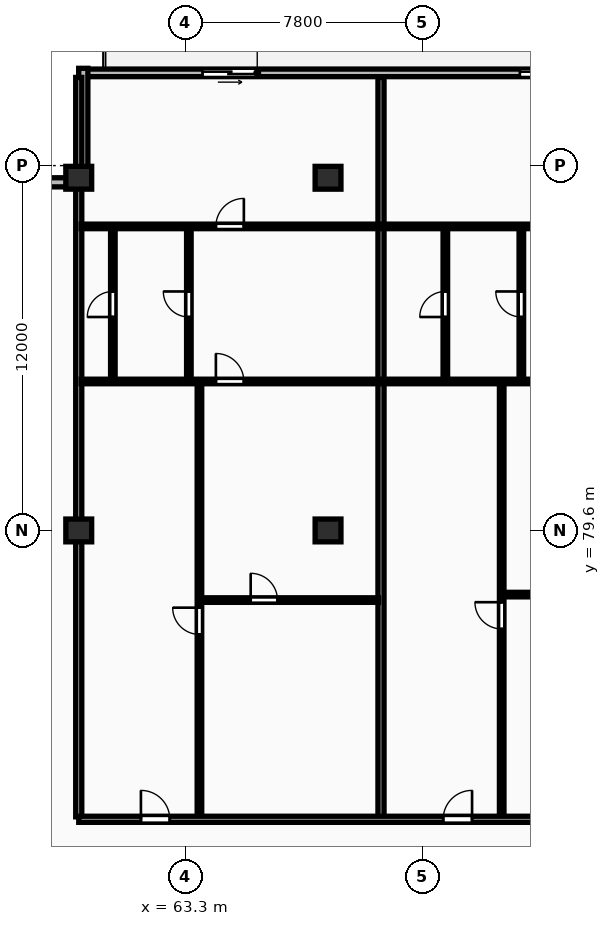
"""IFC4 building model, lengths in metres.
Left out: names, types, materials, properties, quantities, classifications, styles, units other than length and angle.
Written with IfcOpenShell. Run it as: python <this file> out.ifc"""

import sys

from ifc_helpers import new_model, si_unit, direction, frame, frame_2d, origin, origin_2d, place, context, subcontext, project, spatial, rectangle, extrude, element, fill, save


model = new_model("IFC4")
c1 = context("Model", 3, precision=1e-05, world=origin(), true_north=direction((0.0, 1.0)))
c2 = subcontext(c1, "Body", "Model", "MODEL_VIEW")
j1 = project(units=[si_unit("LENGTHUNIT", "METRE"), si_unit("PLANEANGLEUNIT", "RADIAN")], contexts=[c1])
p1 = place(None, origin())
s1 = spatial("IfcSite", under=j1, at=p1, CompositionType="ELEMENT")
p2 = place(p1, origin())
s2 = spatial("IfcBuilding", under=s1, at=p2, CompositionType="ELEMENT")
p3 = place(p2, frame((0.0, 0.0, 204.35)))
s3 = spatial("IfcBuildingStorey", under=s2, at=p3, CompositionType="ELEMENT", Elevation=204.35)
for number, where, z_axis, x_axis in (
    (1, (59.8, 79.6, 0.0), (0.0, 0.0, 1.0), (1.0, 0.0, 0.0)),
    (2, (59.8, 91.2, 0.0), (0.0, 0.0, 1.0), (1.0, 0.0, 0.0)),
    (3, (68.0, 79.6, 0.0), (0.0, 0.0, 1.0), (1.0, 0.0, 0.0)),
    (4, (68.0, 91.2, 0.0), (0.0, 0.0, 1.0), (1.0, 0.0, 0.0)),
):
    element("IfcColumn", number, at=place(p3, frame(where, z_axis=z_axis, x_axis=x_axis)), inside=s3, PredefinedType="COLUMN", context=c2, shape_type="SweptSolid", body=[
        extrude(rectangle(XDim=0.85, YDim=0.75, at=origin_2d()), origin(), (0.0, 0.0, 1.0), 3.25),
    ])
p4 = place(p3, frame((128.4, 94.65, 0.0), z_axis=(0.0, 0.0, 1.0), x_axis=(-1.0, 0.0, 0.0)))
e5 = element("IfcWall", 5, at=p4, inside=s3, PredefinedType="STANDARD", context=c2, shape_type="SweptSolid", body=[
    extrude(rectangle(XDim=68.6, YDim=0.25, at=frame_2d((34.3, 0.0))), origin(), (0.0, 0.0, 1.0), 2.98),
])
p5 = place(p4, frame((62.729, 0.0, 0.0)))
e6 = element("IfcOpeningElement", 6, at=p5, cuts=e5, PredefinedType="OPENING", context=c2, shape_type="SweptSolid", body=[
    extrude(rectangle(XDim=1.8, YDim=2.2, at=frame_2d((0.9, 1.1))), frame((0.0, 0.135, 0.0), z_axis=(0.0, -1.0, 0.0), x_axis=(1.0, 0.0, 0.0)), (0.0, 0.0, 1.0), 0.27),
])
p6 = place(p4, frame((52.29, 0.0, 0.0)))
e7 = element("IfcOpeningElement", 7, at=p6, cuts=e5, PredefinedType="OPENING", context=c2, shape_type="SweptSolid", body=[
    extrude(rectangle(XDim=1.8, YDim=2.2, at=frame_2d((0.9, 1.1))), frame((0.0, 0.135, 0.0), z_axis=(0.0, -1.0, 0.0), x_axis=(1.0, 0.0, 0.0)), (0.0, 0.0, 1.0), 0.27),
])
p7 = place(p4, frame((41.851, 0.0, 0.0)))
e8 = element("IfcOpeningElement", 8, at=p7, cuts=e5, PredefinedType="OPENING", context=c2, shape_type="SweptSolid", body=[
    extrude(rectangle(XDim=1.8, YDim=2.2, at=frame_2d((0.9, 1.1))), frame((0.0, 0.135, 0.0), z_axis=(0.0, -1.0, 0.0), x_axis=(1.0, 0.0, 0.0)), (0.0, 0.0, 1.0), 0.27),
])
p8 = place(p4, frame((31.412, 0.0, 0.0)))
e9 = element("IfcOpeningElement", 9, at=p8, cuts=e5, PredefinedType="OPENING", context=c2, shape_type="SweptSolid", body=[
    extrude(rectangle(XDim=1.8, YDim=2.2, at=frame_2d((0.9, 1.1))), frame((0.0, 0.135, 0.0), z_axis=(0.0, -1.0, 0.0), x_axis=(1.0, 0.0, 0.0)), (0.0, 0.0, 1.0), 0.27),
])
p9 = place(p4, frame((21.552, 0.0, 0.0)))
e10 = element("IfcOpeningElement", 10, at=p9, cuts=e5, PredefinedType="OPENING", context=c2, shape_type="SweptSolid", body=[
    extrude(rectangle(XDim=1.8, YDim=2.2, at=frame_2d((0.9, 1.1))), frame((0.0, 0.135, 0.0), z_axis=(0.0, -1.0, 0.0), x_axis=(1.0, 0.0, 0.0)), (0.0, 0.0, 1.0), 0.27),
])
p10 = place(p4, frame((14.909, 0.0, 0.85)))
e11 = element("IfcOpeningElement", 11, at=p10, cuts=e5, PredefinedType="OPENING", context=c2, shape_type="SweptSolid", body=[
    extrude(rectangle(XDim=2.4, YDim=1.9, at=frame_2d((1.2, 0.95))), frame((0.0, 0.135, 0.0), z_axis=(0.0, -1.0, 0.0), x_axis=(1.0, 0.0, 0.0)), (0.0, 0.0, 1.0), 0.27),
])
p11 = place(p4, frame((7.709, 0.0, 0.0)))
e12 = element("IfcOpeningElement", 12, at=p11, cuts=e5, PredefinedType="OPENING", context=c2, shape_type="SweptSolid", body=[
    extrude(rectangle(XDim=1.8, YDim=2.2, at=frame_2d((0.9, 1.1))), frame((0.0, 0.135, 0.0), z_axis=(0.0, -1.0, 0.0), x_axis=(1.0, 0.0, 0.0)), (0.0, 0.0, 1.0), 0.27),
])
p12 = place(p4, frame((0.87, 0.0, 0.85)))
e13 = element("IfcOpeningElement", 13, at=p12, cuts=e5, PredefinedType="OPENING", context=c2, shape_type="SweptSolid", body=[
    extrude(rectangle(XDim=1.8, YDim=1.8, at=frame_2d((0.9, 0.9))), frame((0.0, 0.135, 0.0), z_axis=(0.0, -1.0, 0.0), x_axis=(1.0, 0.0, 0.0)), (0.0, 0.0, 1.0), 0.27),
])
for number, where, z_axis, x_axis in (
    (14, (59.95, 94.8, 0.0), (0.0, 0.0, 1.0), (0.0, -1.0, 0.0)),
    (15, (59.8, 91.05, 0.0), (0.0, 0.0, 1.0), (-1.0, 0.0, 0.0)),
):
    element("IfcWall", number, at=place(p3, frame(where, z_axis=z_axis, x_axis=x_axis)), inside=s3, PredefinedType="STANDARD", context=c2, shape_type="SweptSolid", body=[
        extrude(rectangle(XDim=3.6, YDim=0.3, at=frame_2d((1.8, 0.0))), origin(), (0.0, 0.0, 1.0), 2.98),
    ])
p13 = place(p3, frame((59.8, 70.18, 0.0), z_axis=(0.0, 0.0, 1.0), x_axis=(0.0, 1.0, 0.0)))
e16 = element("IfcWall", 16, at=p13, inside=s3, PredefinedType="PARTITIONING", context=c2, shape_type="SweptSolid", body=[
    extrude(rectangle(XDim=24.32, YDim=0.2, at=frame_2d((12.16, 0.0))), origin(), (0.0, 0.0, 1.0), 2.287),
])
p14 = place(p3, frame((69.742, 70.18, 0.0), z_axis=(0.0, 0.0, 1.0), x_axis=(0.0, 1.0, 0.0)))
e17 = element("IfcWall", 17, at=p14, inside=s3, PredefinedType="PARTITIONING", context=c2, shape_type="SweptSolid", body=[
    extrude(rectangle(XDim=24.32, YDim=0.2, at=frame_2d((12.16, 0.0))), origin(), (0.0, 0.0, 1.0), 2.98),
])
p15 = place(p3, frame((63.83, 77.31, 0.0), z_axis=(0.0, 0.0, 1.0), x_axis=(1.0, 0.0, 0.0)))
e18 = element("IfcWall", 18, at=p15, inside=s3, PredefinedType="PARTITIONING", context=c2, shape_type="SweptSolid", body=[
    extrude(rectangle(XDim=5.832, YDim=0.15, at=frame_2d((2.916, 0.0))), origin(), (0.0, 0.0, 1.0), 2.98),
])
p16 = place(p15, frame((1.625, 0.0, 0.0)))
e19 = element("IfcOpeningElement", 19, at=p16, cuts=e18, PredefinedType="OPENING", context=c2, shape_type="SweptSolid", body=[
    extrude(rectangle(XDim=0.88, YDim=2.06, at=frame_2d((0.44, 1.03))), frame((0.0, 0.085, 0.0), z_axis=(0.0, -1.0, 0.0), x_axis=(1.0, 0.0, 0.0)), (0.0, 0.0, 1.0), 0.17),
])
p17 = place(p3, frame((63.77, 70.16, 0.0), z_axis=(0.0, 0.0, 1.0), x_axis=(0.0, 1.0, 0.0)))
e20 = element("IfcWall", 20, at=p17, inside=s3, PredefinedType="PARTITIONING", context=c2, shape_type="SweptSolid", body=[
    extrude(rectangle(XDim=14.3, YDim=0.15, at=frame_2d((7.15, 0.0))), origin(), (0.0, 0.0, 1.0), 2.98),
])
p18 = place(p17, frame((6.02, 0.0, 0.0)))
e21 = element("IfcOpeningElement", 21, at=p18, cuts=e20, PredefinedType="OPENING", context=c2, shape_type="SweptSolid", body=[
    extrude(rectangle(XDim=0.88, YDim=2.06, at=frame_2d((0.44, 1.03))), frame((0.0, 0.085, 0.0), z_axis=(0.0, -1.0, 0.0), x_axis=(1.0, 0.0, 0.0)), (0.0, 0.0, 1.0), 0.17),
])
p19 = place(p3, frame((60.922, 84.54, 0.0), z_axis=(0.0, 0.0, 1.0), x_axis=(0.0, 1.0, 0.0)))
e22 = element("IfcWall", 22, at=p19, inside=s3, PredefinedType="PARTITIONING", context=c2, shape_type="SweptSolid", body=[
    extrude(rectangle(XDim=5.0, YDim=0.15, at=frame_2d((2.5, 0.0))), origin(), (0.0, 0.0, 1.0), 2.98),
])
p20 = place(p19, frame((2.08, 0.0, 0.0)))
e23 = element("IfcOpeningElement", 23, at=p20, cuts=e22, PredefinedType="OPENING", context=c2, shape_type="SweptSolid", body=[
    extrude(rectangle(XDim=0.84, YDim=2.04, at=frame_2d((0.42, 1.02))), frame((0.0, 0.085, 0.0), z_axis=(0.0, -1.0, 0.0), x_axis=(1.0, 0.0, 0.0)), (0.0, 0.0, 1.0), 0.17),
])
p21 = place(p3, frame((63.422, 84.54, 0.0), z_axis=(0.0, 0.0, 1.0), x_axis=(0.0, 1.0, 0.0)))
e24 = element("IfcWall", 24, at=p21, inside=s3, PredefinedType="PARTITIONING", context=c2, shape_type="SweptSolid", body=[
    extrude(rectangle(XDim=5.0, YDim=0.15, at=frame_2d((2.5, 0.0))), origin(), (0.0, 0.0, 1.0), 2.98),
])
p22 = place(p21, frame((2.08, 0.0, 0.0)))
e25 = element("IfcOpeningElement", 25, at=p22, cuts=e24, PredefinedType="OPENING", context=c2, shape_type="SweptSolid", body=[
    extrude(rectangle(XDim=0.84, YDim=2.04, at=frame_2d((0.42, 1.02))), frame((0.0, 0.085, 0.0), z_axis=(0.0, -1.0, 0.0), x_axis=(1.0, 0.0, 0.0)), (0.0, 0.0, 1.0), 0.17),
])
p23 = place(p3, frame((59.88, 84.5, 0.0), z_axis=(0.0, 0.0, 1.0), x_axis=(1.0, 0.0, 0.0)))
e26 = element("IfcWall", 26, at=p23, inside=s3, PredefinedType="PARTITIONING", context=c2, shape_type="SweptSolid", body=[
    extrude(rectangle(XDim=9.782, YDim=0.15, at=frame_2d((4.891, 0.0))), origin(), (0.0, 0.0, 1.0), 2.98),
])
p24 = place(p23, frame((4.431, 0.0, 0.0)))
e27 = element("IfcOpeningElement", 27, at=p24, cuts=e26, PredefinedType="OPENING", context=c2, shape_type="SweptSolid", body=[
    extrude(rectangle(XDim=0.92, YDim=2.08, at=frame_2d((0.46, 1.04))), frame((0.0, 0.085, 0.0), z_axis=(0.0, -1.0, 0.0), x_axis=(1.0, 0.0, 0.0)), (0.0, 0.0, 1.0), 0.17),
])
p25 = place(p3, frame((59.88, 89.6, 0.0), z_axis=(0.0, 0.0, 1.0), x_axis=(1.0, 0.0, 0.0)))
e28 = element("IfcWall", 28, at=p25, inside=s3, PredefinedType="PARTITIONING", context=c2, shape_type="SweptSolid", body=[
    extrude(rectangle(XDim=9.782, YDim=0.15, at=frame_2d((4.891, 0.0))), origin(), (0.0, 0.0, 1.0), 2.98),
])
p26 = place(p25, frame((4.431, 0.0, 0.0)))
e29 = element("IfcOpeningElement", 29, at=p26, cuts=e28, PredefinedType="OPENING", context=c2, shape_type="SweptSolid", body=[
    extrude(rectangle(XDim=0.92, YDim=2.08, at=frame_2d((0.46, 1.04))), frame((0.0, 0.085, 0.0), z_axis=(0.0, -1.0, 0.0), x_axis=(1.0, 0.0, 0.0)), (0.0, 0.0, 1.0), 0.17),
])
p27 = place(p3, frame((73.772, 77.49, 0.0), z_axis=(0.0, 0.0, 1.0), x_axis=(1.0, 0.0, 0.0)))
e30 = element("IfcWall", 30, at=p27, inside=s3, PredefinedType="PARTITIONING", context=c2, shape_type="SweptSolid", body=[
    extrude(rectangle(XDim=6.826, YDim=0.15, at=frame_2d((3.413, 0.0))), origin(), (0.0, 0.0, 1.0), 2.98),
])
p28 = place(p27, frame((4.022, 0.0, 0.0)))
e31 = element("IfcOpeningElement", 31, at=p28, cuts=e30, PredefinedType="OPENING", context=c2, shape_type="SweptSolid", body=[
    extrude(rectangle(XDim=0.88, YDim=2.06, at=frame_2d((0.44, 1.03))), frame((0.0, 0.085, 0.0), z_axis=(0.0, -1.0, 0.0), x_axis=(1.0, 0.0, 0.0)), (0.0, 0.0, 1.0), 0.17),
])
p29 = place(p3, frame((73.712, 70.16, 0.0), z_axis=(0.0, 0.0, 1.0), x_axis=(0.0, 1.0, 0.0)))
e32 = element("IfcWall", 32, at=p29, inside=s3, PredefinedType="PARTITIONING", context=c2, shape_type="SweptSolid", body=[
    extrude(rectangle(XDim=14.3, YDim=0.15, at=frame_2d((7.15, 0.0))), origin(), (0.0, 0.0, 1.0), 2.98),
])
p30 = place(p29, frame((6.2, 0.0, 0.0)))
e33 = element("IfcOpeningElement", 33, at=p30, cuts=e32, PredefinedType="OPENING", context=c2, shape_type="SweptSolid", body=[
    extrude(rectangle(XDim=0.88, YDim=2.06, at=frame_2d((0.44, 1.03))), frame((0.0, 0.085, 0.0), z_axis=(0.0, -1.0, 0.0), x_axis=(1.0, 0.0, 0.0)), (0.0, 0.0, 1.0), 0.17),
])
p31 = place(p3, frame((71.858, 84.54, 0.0), z_axis=(0.0, 0.0, 1.0), x_axis=(0.0, 1.0, 0.0)))
e34 = element("IfcWall", 34, at=p31, inside=s3, PredefinedType="PARTITIONING", context=c2, shape_type="SweptSolid", body=[
    extrude(rectangle(XDim=5.0, YDim=0.15, at=frame_2d((2.5, 0.0))), origin(), (0.0, 0.0, 1.0), 2.98),
])
p32 = place(p31, frame((2.08, 0.0, 0.0)))
e35 = element("IfcOpeningElement", 35, at=p32, cuts=e34, PredefinedType="OPENING", context=c2, shape_type="SweptSolid", body=[
    extrude(rectangle(XDim=0.84, YDim=2.04, at=frame_2d((0.42, 1.02))), frame((0.0, 0.085, 0.0), z_axis=(0.0, -1.0, 0.0), x_axis=(1.0, 0.0, 0.0)), (0.0, 0.0, 1.0), 0.17),
])
p33 = place(p3, frame((74.358, 84.54, 0.0), z_axis=(0.0, 0.0, 1.0), x_axis=(0.0, 1.0, 0.0)))
e36 = element("IfcWall", 36, at=p33, inside=s3, PredefinedType="PARTITIONING", context=c2, shape_type="SweptSolid", body=[
    extrude(rectangle(XDim=5.0, YDim=0.15, at=frame_2d((2.5, 0.0))), origin(), (0.0, 0.0, 1.0), 2.98),
])
p34 = place(p33, frame((2.08, 0.0, 0.0)))
e37 = element("IfcOpeningElement", 37, at=p34, cuts=e36, PredefinedType="OPENING", context=c2, shape_type="SweptSolid", body=[
    extrude(rectangle(XDim=0.84, YDim=2.04, at=frame_2d((0.42, 1.02))), frame((0.0, 0.085, 0.0), z_axis=(0.0, -1.0, 0.0), x_axis=(1.0, 0.0, 0.0)), (0.0, 0.0, 1.0), 0.17),
])
p35 = place(p3, frame((69.822, 84.5, 0.0), z_axis=(0.0, 0.0, 1.0), x_axis=(1.0, 0.0, 0.0)))
e38 = element("IfcWall", 38, at=p35, inside=s3, PredefinedType="PARTITIONING", context=c2, shape_type="SweptSolid", body=[
    extrude(rectangle(XDim=10.776, YDim=0.15, at=frame_2d((5.388, 0.0))), origin(), (0.0, 0.0, 1.0), 2.98),
])
p36 = place(p35, frame((4.928, 0.0, 0.0)))
e39 = element("IfcOpeningElement", 39, at=p36, cuts=e38, PredefinedType="OPENING", context=c2, shape_type="SweptSolid", body=[
    extrude(rectangle(XDim=0.92, YDim=2.08, at=frame_2d((0.46, 1.04))), frame((0.0, 0.085, 0.0), z_axis=(0.0, -1.0, 0.0), x_axis=(1.0, 0.0, 0.0)), (0.0, 0.0, 1.0), 0.17),
])
p37 = place(p3, frame((69.822, 89.6, 0.0), z_axis=(0.0, 0.0, 1.0), x_axis=(1.0, 0.0, 0.0)))
e40 = element("IfcWall", 40, at=p37, inside=s3, PredefinedType="PARTITIONING", context=c2, shape_type="SweptSolid", body=[
    extrude(rectangle(XDim=10.776, YDim=0.15, at=frame_2d((5.388, 0.0))), origin(), (0.0, 0.0, 1.0), 2.98),
])
p38 = place(p37, frame((7.941, 0.0, 0.0)))
e41 = element("IfcOpeningElement", 41, at=p38, cuts=e40, PredefinedType="OPENING", context=c2, shape_type="SweptSolid", body=[
    extrude(rectangle(XDim=0.92, YDim=2.08, at=frame_2d((0.46, 1.04))), frame((0.0, 0.085, 0.0), z_axis=(0.0, -1.0, 0.0), x_axis=(1.0, 0.0, 0.0)), (0.0, 0.0, 1.0), 0.17),
])
p39 = place(p3, frame((59.8, 70.1, 0.0), z_axis=(0.0, 0.0, 1.0), x_axis=(1.0, 0.0, 0.0)))
e42 = element("IfcWall", 42, at=p39, inside=s3, PredefinedType="PARTITIONING", context=c2, shape_type="SweptSolid", body=[
    extrude(rectangle(XDim=68.6, YDim=0.2, at=frame_2d((34.3, 0.0))), origin(), (0.0, 0.0, 1.0), 2.98),
])
p40 = place(p39, frame((2.045, 0.0, 0.0)))
e43 = element("IfcOpeningElement", 43, at=p40, cuts=e42, PredefinedType="OPENING", context=c2, shape_type="SweptSolid", body=[
    extrude(rectangle(XDim=0.95, YDim=2.15, at=frame_2d((0.475, 1.075))), frame((0.0, 0.11, 0.0), z_axis=(0.0, -1.0, 0.0), x_axis=(1.0, 0.0, 0.0)), (0.0, 0.0, 1.0), 0.22),
])
p41 = place(p39, frame((11.987, 0.0, 0.0)))
e44 = element("IfcOpeningElement", 44, at=p41, cuts=e42, PredefinedType="OPENING", context=c2, shape_type="SweptSolid", body=[
    extrude(rectangle(XDim=0.95, YDim=2.15, at=frame_2d((0.475, 1.075))), frame((0.0, 0.11, 0.0), z_axis=(0.0, -1.0, 0.0), x_axis=(1.0, 0.0, 0.0)), (0.0, 0.0, 1.0), 0.22),
])
p42 = place(p39, frame((22.923, 0.0, 0.0)))
e45 = element("IfcOpeningElement", 45, at=p42, cuts=e42, PredefinedType="OPENING", context=c2, shape_type="SweptSolid", body=[
    extrude(rectangle(XDim=0.95, YDim=2.15, at=frame_2d((0.475, 1.075))), frame((0.0, 0.11, 0.0), z_axis=(0.0, -1.0, 0.0), x_axis=(1.0, 0.0, 0.0)), (0.0, 0.0, 1.0), 0.22),
])
p43 = place(p39, frame((32.865, 0.0, 0.0)))
e46 = element("IfcOpeningElement", 46, at=p43, cuts=e42, PredefinedType="OPENING", context=c2, shape_type="SweptSolid", body=[
    extrude(rectangle(XDim=0.95, YDim=2.15, at=frame_2d((0.475, 1.075))), frame((0.0, 0.11, 0.0), z_axis=(0.0, -1.0, 0.0), x_axis=(1.0, 0.0, 0.0)), (0.0, 0.0, 1.0), 0.22),
])
p44 = place(p39, frame((43.802, 0.0, 0.0)))
e47 = element("IfcOpeningElement", 47, at=p44, cuts=e42, PredefinedType="OPENING", context=c2, shape_type="SweptSolid", body=[
    extrude(rectangle(XDim=0.95, YDim=2.15, at=frame_2d((0.475, 1.075))), frame((0.0, 0.11, 0.0), z_axis=(0.0, -1.0, 0.0), x_axis=(1.0, 0.0, 0.0)), (0.0, 0.0, 1.0), 0.22),
])
p45 = place(p39, frame((56.726, 0.0, 0.0)))
e48 = element("IfcOpeningElement", 48, at=p45, cuts=e42, PredefinedType="OPENING", context=c2, shape_type="SweptSolid", body=[
    extrude(rectangle(XDim=0.95, YDim=2.15, at=frame_2d((0.475, 1.075))), frame((0.0, 0.11, 0.0), z_axis=(0.0, -1.0, 0.0), x_axis=(1.0, 0.0, 0.0)), (0.0, 0.0, 1.0), 0.22),
])
p46 = place(p5, origin())
e49 = element("IfcDoor", 49, at=p46, inside=s3, OperationType="SLIDING_TO_LEFT", PredefinedType="DOOR", context=c2, shape_type="SweptSolid", body=[
    extrude(rectangle(XDim=1.8, YDim=2.2, at=frame_2d((0.9, 1.1))), frame((0.0, 0.025, 0.0), z_axis=(0.0, -1.0, 0.0), x_axis=(1.0, 0.0, 0.0)), (0.0, 0.0, 1.0), 0.05),
])
fill(e6, e49)
p47 = place(p6, origin())
e50 = element("IfcDoor", 50, at=p47, inside=s3, OperationType="SLIDING_TO_LEFT", PredefinedType="DOOR", context=c2, shape_type="SweptSolid", body=[
    extrude(rectangle(XDim=1.8, YDim=2.2, at=frame_2d((0.9, 1.1))), frame((0.0, 0.025, 0.0), z_axis=(0.0, -1.0, 0.0), x_axis=(1.0, 0.0, 0.0)), (0.0, 0.0, 1.0), 0.05),
])
fill(e7, e50)
p48 = place(p16, origin())
e51 = element("IfcDoor", 51, at=p48, inside=s3, OperationType="SINGLE_SWING_LEFT", PredefinedType="DOOR", context=c2, shape_type="SweptSolid", body=[
    extrude(rectangle(XDim=0.88, YDim=2.06, at=frame_2d((0.44, 1.03))), frame((0.0, 0.025, 0.0), z_axis=(0.0, -1.0, 0.0), x_axis=(1.0, 0.0, 0.0)), (0.0, 0.0, 1.0), 0.05),
])
fill(e19, e51)
p49 = place(p18, origin())
e52 = element("IfcDoor", 52, at=p49, inside=s3, OperationType="SINGLE_SWING_RIGHT", PredefinedType="DOOR", context=c2, shape_type="SweptSolid", body=[
    extrude(rectangle(XDim=0.88, YDim=2.06, at=frame_2d((0.44, 1.03))), frame((0.0, 0.025, 0.0), z_axis=(0.0, -1.0, 0.0), x_axis=(1.0, 0.0, 0.0)), (0.0, 0.0, 1.0), 0.05),
])
fill(e21, e52)
p50 = place(p20, origin())
e53 = element("IfcDoor", 53, at=p50, inside=s3, OperationType="SINGLE_SWING_LEFT", PredefinedType="DOOR", context=c2, shape_type="SweptSolid", body=[
    extrude(rectangle(XDim=0.84, YDim=2.04, at=frame_2d((0.42, 1.02))), frame((0.0, 0.025, 0.0), z_axis=(0.0, -1.0, 0.0), x_axis=(1.0, 0.0, 0.0)), (0.0, 0.0, 1.0), 0.05),
])
fill(e23, e53)
p51 = place(p22, origin())
e54 = element("IfcDoor", 54, at=p51, inside=s3, OperationType="SINGLE_SWING_RIGHT", PredefinedType="DOOR", context=c2, shape_type="SweptSolid", body=[
    extrude(rectangle(XDim=0.84, YDim=2.04, at=frame_2d((0.42, 1.02))), frame((0.0, 0.025, 0.0), z_axis=(0.0, -1.0, 0.0), x_axis=(1.0, 0.0, 0.0)), (0.0, 0.0, 1.0), 0.05),
])
fill(e25, e54)
p52 = place(p24, origin())
e55 = element("IfcDoor", 55, at=p52, inside=s3, OperationType="SINGLE_SWING_LEFT", PredefinedType="DOOR", context=c2, shape_type="SweptSolid", body=[
    extrude(rectangle(XDim=0.92, YDim=2.08, at=frame_2d((0.46, 1.04))), frame((0.0, 0.025, 0.0), z_axis=(0.0, -1.0, 0.0), x_axis=(1.0, 0.0, 0.0)), (0.0, 0.0, 1.0), 0.05),
])
fill(e27, e55)
p53 = place(p26, origin())
e56 = element("IfcDoor", 56, at=p53, inside=s3, OperationType="SINGLE_SWING_RIGHT", PredefinedType="DOOR", context=c2, shape_type="SweptSolid", body=[
    extrude(rectangle(XDim=0.92, YDim=2.08, at=frame_2d((0.46, 1.04))), frame((0.0, 0.025, 0.0), z_axis=(0.0, -1.0, 0.0), x_axis=(1.0, 0.0, 0.0)), (0.0, 0.0, 1.0), 0.05),
])
fill(e29, e56)
p54 = place(p30, origin())
e57 = element("IfcDoor", 57, at=p54, inside=s3, OperationType="SINGLE_SWING_RIGHT", PredefinedType="DOOR", context=c2, shape_type="SweptSolid", body=[
    extrude(rectangle(XDim=0.88, YDim=2.06, at=frame_2d((0.44, 1.03))), frame((0.0, 0.025, 0.0), z_axis=(0.0, -1.0, 0.0), x_axis=(1.0, 0.0, 0.0)), (0.0, 0.0, 1.0), 0.05),
])
fill(e33, e57)
p55 = place(p32, origin())
e58 = element("IfcDoor", 58, at=p55, inside=s3, OperationType="SINGLE_SWING_LEFT", PredefinedType="DOOR", context=c2, shape_type="SweptSolid", body=[
    extrude(rectangle(XDim=0.84, YDim=2.04, at=frame_2d((0.42, 1.02))), frame((0.0, 0.025, 0.0), z_axis=(0.0, -1.0, 0.0), x_axis=(1.0, 0.0, 0.0)), (0.0, 0.0, 1.0), 0.05),
])
fill(e35, e58)
p56 = place(p34, origin())
e59 = element("IfcDoor", 59, at=p56, inside=s3, OperationType="SINGLE_SWING_RIGHT", PredefinedType="DOOR", context=c2, shape_type="SweptSolid", body=[
    extrude(rectangle(XDim=0.84, YDim=2.04, at=frame_2d((0.42, 1.02))), frame((0.0, 0.025, 0.0), z_axis=(0.0, -1.0, 0.0), x_axis=(1.0, 0.0, 0.0)), (0.0, 0.0, 1.0), 0.05),
])
fill(e37, e59)
p57 = place(p40, origin())
e60 = element("IfcDoor", 60, at=p57, inside=s3, OperationType="SINGLE_SWING_LEFT", PredefinedType="DOOR", context=c2, shape_type="SweptSolid", body=[
    extrude(rectangle(XDim=0.95, YDim=2.15, at=frame_2d((0.475, 1.075))), frame((0.0, 0.025, 0.0), z_axis=(0.0, -1.0, 0.0), x_axis=(1.0, 0.0, 0.0)), (0.0, 0.0, 1.0), 0.05),
])
fill(e43, e60)
p58 = place(p41, origin())
e61 = element("IfcDoor", 61, at=p58, inside=s3, OperationType="SINGLE_SWING_RIGHT", PredefinedType="DOOR", context=c2, shape_type="SweptSolid", body=[
    extrude(rectangle(XDim=0.95, YDim=2.15, at=frame_2d((0.475, 1.075))), frame((0.0, 0.025, 0.0), z_axis=(0.0, -1.0, 0.0), x_axis=(1.0, 0.0, 0.0)), (0.0, 0.0, 1.0), 0.05),
])
fill(e44, e61)
save(model, sys.argv[1])
